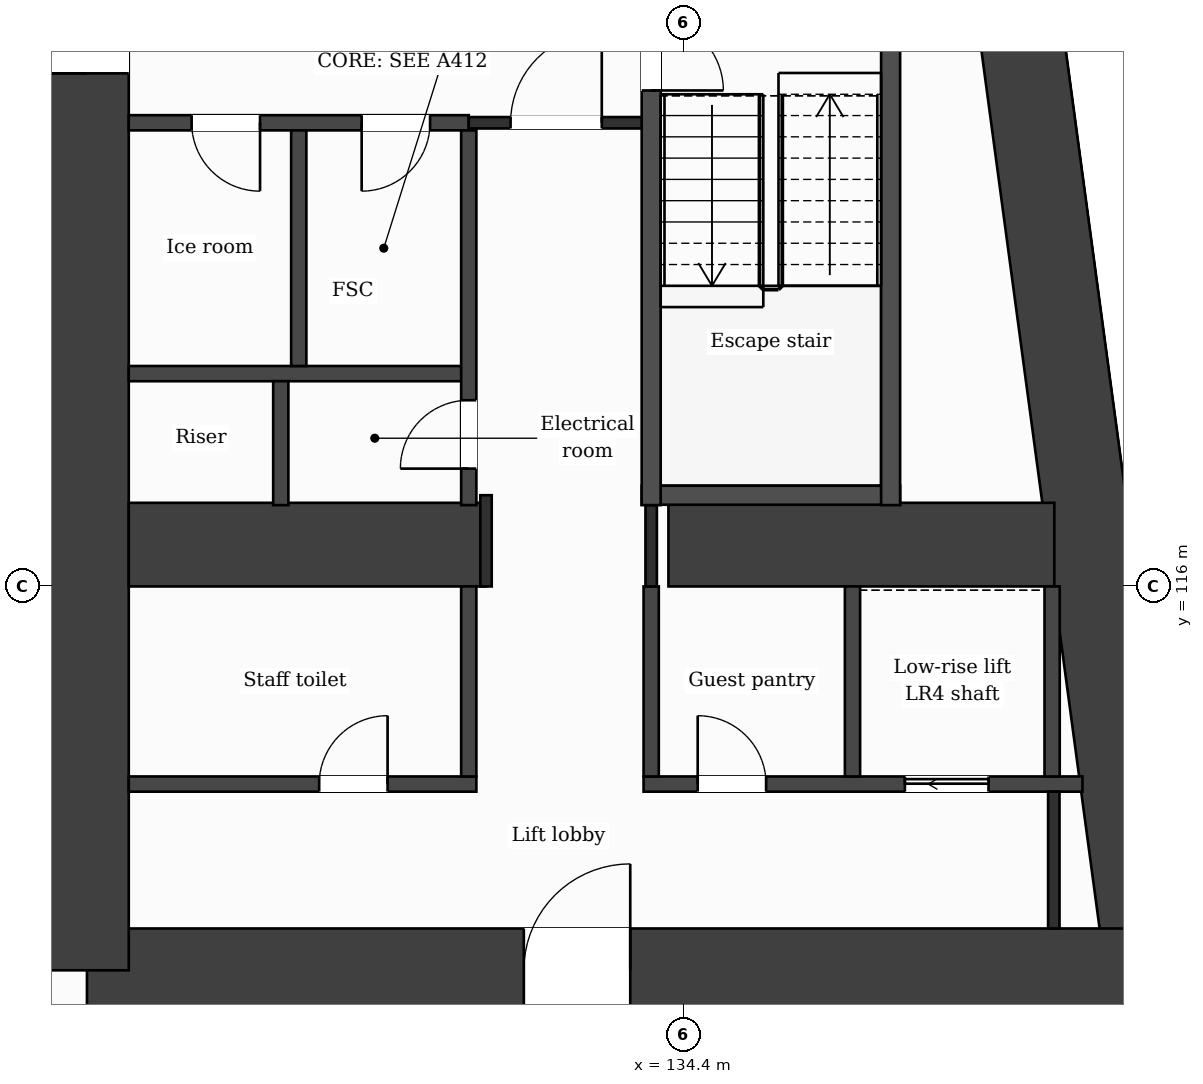
"""IFC4 building model, lengths in metres.
Left out: names, types, materials, properties, quantities, classifications, styles, units other than length and angle.
Written with IfcOpenShell. Run it as: python <this file> out.ifc"""

import sys

from ifc_helpers import new_model, si_unit, direction, frame, frame_2d, origin, place, context, subcontext, project, spatial, rectangle, extrude, element, fill, save


model = new_model("IFC4")
c1 = context("Model", 3, precision=1e-05, world=origin(), true_north=direction((0.0, 1.0)))
c2 = subcontext(c1, "Body", "Model", "MODEL_VIEW")
j1 = project(units=[si_unit("LENGTHUNIT", "METRE"), si_unit("PLANEANGLEUNIT", "RADIAN")], contexts=[c1])
p1 = place(None, origin())
s1 = spatial("IfcSite", under=j1, at=p1, CompositionType="ELEMENT")
p2 = place(p1, origin())
s2 = spatial("IfcBuilding", under=s1, at=p2, CompositionType="ELEMENT")
p3 = place(p2, frame((0.0, 0.0, 56.5)))
s3 = spatial("IfcBuildingStorey", under=s2, at=p3, CompositionType="ELEMENT", Elevation=56.5)
p4 = place(p3, frame((137.688, 131.85, 0.0), z_axis=(0.0, 0.0, 1.0), x_axis=(0.133411793472, -0.991060691059, 0.0)))
e1 = element("IfcWall", 1, at=p4, inside=s3, PredefinedType="SHEAR", context=c2, shape_type="SweptSolid", body=[
    extrude(rectangle(XDim=21.089, YDim=1.1, at=frame_2d((10.544, 0.0))), origin(), (0.0, 0.0, 1.0), 3.5),
])
p5 = place(p3, frame((140.502, 110.95, 0.0), z_axis=(0.0, 0.0, 1.0), x_axis=(-1.0, 0.0, 0.0)))
e2 = element("IfcWall", 2, at=p5, inside=s3, PredefinedType="SHEAR", context=c2, shape_type="SweptSolid", body=[
    extrude(rectangle(XDim=13.952, YDim=1.1, at=frame_2d((6.976, 0.0))), origin(), (0.0, 0.0, 1.0), 3.5),
])
p6 = place(p5, frame((6.804, 0.0, 0.0)))
e3 = element("IfcOpeningElement", 3, at=p6, cuts=e2, PredefinedType="OPENING", context=c2, shape_type="SweptSolid", body=[
    extrude(rectangle(XDim=1.4, YDim=2.1, at=frame_2d((0.7, 1.05))), frame((0.0, 0.56, 0.0), z_axis=(0.0, -1.0, 0.0), x_axis=(1.0, 0.0, 0.0)), (0.0, 0.0, 1.0), 1.12),
])
p7 = place(p3, frame((126.55, 110.95, 0.0), z_axis=(0.0, 0.0, 1.0), x_axis=(0.0, 1.0, 0.0)))
e4 = element("IfcWall", 4, at=p7, inside=s3, PredefinedType="SHEAR", context=c2, shape_type="SweptSolid", body=[
    extrude(rectangle(XDim=20.9, YDim=1.1, at=frame_2d((10.45, 0.0))), origin(), (0.0, 0.0, 1.0), 3.5),
])
p8 = place(p7, frame((11.8, 0.0, 0.0)))
e5 = element("IfcOpeningElement", 5, at=p8, cuts=e4, PredefinedType="OPENING", context=c2, shape_type="SweptSolid", body=[
    extrude(rectangle(XDim=1.4, YDim=2.1, at=frame_2d((0.7, 1.05))), frame((0.0, 0.56, 0.0), z_axis=(0.0, -1.0, 0.0), x_axis=(1.0, 0.0, 0.0)), (0.0, 0.0, 1.0), 1.12),
])
p9 = place(p3, frame((127.1, 116.55, 0.0), z_axis=(0.0, 0.0, 1.0), x_axis=(1.0, 0.0, 0.0)))
e6 = element("IfcWall", 6, at=p9, inside=s3, PredefinedType="SHEAR", context=c2, shape_type="SweptSolid", body=[
    extrude(rectangle(XDim=4.7, YDim=1.1, at=frame_2d((2.35, 0.0))), origin(), (0.0, 0.0, 1.0), 3.5),
])
p10 = place(p3, frame((134.2, 116.55, 0.0), z_axis=(0.0, 0.0, 1.0), x_axis=(1.0, 0.0, 0.0)))
e7 = element("IfcWall", 7, at=p10, inside=s3, PredefinedType="SHEAR", context=c2, shape_type="SweptSolid", body=[
    extrude(rectangle(XDim=5.077, YDim=1.1, at=frame_2d((2.539, 0.0))), origin(), (0.0, 0.0, 1.0), 3.5),
])
p11 = place(p3, frame((127.1, 113.4, 0.0), z_axis=(0.0, 0.0, 1.0), x_axis=(1.0, 0.0, 0.0)))
e8 = element("IfcWall", 8, at=p11, inside=s3, PredefinedType="PARTITIONING", context=c2, shape_type="SweptSolid", body=[
    extrude(rectangle(XDim=4.573, YDim=0.2, at=frame_2d((2.287, 0.0))), origin(), (0.0, 0.0, 1.0), 3.18),
])
p12 = place(p11, frame((2.505, 0.0, 0.0)))
e9 = element("IfcOpeningElement", 9, at=p12, cuts=e8, PredefinedType="OPENING", context=c2, shape_type="SweptSolid", body=[
    extrude(rectangle(XDim=0.9, YDim=2.1, at=frame_2d((0.45, 1.05))), frame((0.0, 0.11, 0.0), z_axis=(0.0, -1.0, 0.0), x_axis=(1.0, 0.0, 0.0)), (0.0, 0.0, 1.0), 0.22),
])
p13 = place(p3, frame((133.873, 113.4, 0.0), z_axis=(0.0, 0.0, 1.0), x_axis=(1.0, 0.0, 0.0)))
e10 = element("IfcWall", 10, at=p13, inside=s3, PredefinedType="PARTITIONING", context=c2, shape_type="SweptSolid", body=[
    extrude(rectangle(XDim=5.774, YDim=0.2, at=frame_2d((2.887, 0.0))), origin(), (0.0, 0.0, 1.0), 3.18),
])
p14 = place(p13, frame((3.438, 0.0, 0.0)))
e11 = element("IfcOpeningElement", 11, at=p14, cuts=e10, PredefinedType="OPENING", context=c2, shape_type="SweptSolid", body=[
    extrude(rectangle(XDim=1.1, YDim=2.1, at=frame_2d((0.55, 1.05))), frame((0.0, 0.11, 0.0), z_axis=(0.0, -1.0, 0.0), x_axis=(1.0, 0.0, 0.0)), (0.0, 0.0, 1.0), 0.22),
])
p15 = place(p13, frame((0.712, 0.0, 0.0)))
e12 = element("IfcOpeningElement", 12, at=p15, cuts=e10, PredefinedType="OPENING", context=c2, shape_type="SweptSolid", body=[
    extrude(rectangle(XDim=0.9, YDim=2.1, at=frame_2d((0.45, 1.05))), frame((0.0, 0.11, 0.0), z_axis=(0.0, -1.0, 0.0), x_axis=(1.0, 0.0, 0.0)), (0.0, 0.0, 1.0), 0.22),
])
p16 = place(p3, frame((133.848, 117.2, 0.0), z_axis=(0.0, 0.0, 1.0), x_axis=(1.0, 0.0, 0.0)))
e13 = element("IfcWall", 13, at=p16, inside=s3, PredefinedType="PARTITIONING", context=c2, shape_type="SweptSolid", body=[
    extrude(rectangle(XDim=3.4, YDim=0.25, at=frame_2d((1.7, 0.0))), origin(), (0.0, 0.0, 1.0), 3.18),
])
p17 = place(p3, frame((127.1, 118.8, 0.0), z_axis=(0.0, 0.0, 1.0), x_axis=(1.0, 0.0, 0.0)))
e14 = element("IfcWall", 14, at=p17, inside=s3, PredefinedType="PARTITIONING", context=c2, shape_type="SweptSolid", body=[
    extrude(rectangle(XDim=4.473, YDim=0.2, at=frame_2d((2.236, 0.0))), origin(), (0.0, 0.0, 1.0), 3.18),
])
p18 = place(p3, frame((127.1, 122.1, 0.0), z_axis=(0.0, 0.0, 1.0), x_axis=(1.0, 0.0, 0.0)))
e15 = element("IfcWall", 15, at=p18, inside=s3, PredefinedType="PARTITIONING", context=c2, shape_type="SweptSolid", body=[
    extrude(rectangle(XDim=4.473, YDim=0.2, at=frame_2d((2.236, 0.0))), origin(), (0.0, 0.0, 1.0), 3.18),
])
p19 = place(p18, frame((3.064, 0.0, 0.0)))
e16 = element("IfcOpeningElement", 16, at=p19, cuts=e15, PredefinedType="OPENING", context=c2, shape_type="SweptSolid", body=[
    extrude(rectangle(XDim=0.9, YDim=2.1, at=frame_2d((0.45, 1.05))), frame((0.0, 0.11, 0.0), z_axis=(0.0, -1.0, 0.0), x_axis=(1.0, 0.0, 0.0)), (0.0, 0.0, 1.0), 0.22),
])
p20 = place(p18, frame((0.827, 0.0, 0.0)))
e17 = element("IfcOpeningElement", 17, at=p20, cuts=e15, PredefinedType="OPENING", context=c2, shape_type="SweptSolid", body=[
    extrude(rectangle(XDim=0.9, YDim=2.1, at=frame_2d((0.45, 1.05))), frame((0.0, 0.11, 0.0), z_axis=(0.0, -1.0, 0.0), x_axis=(1.0, 0.0, 0.0)), (0.0, 0.0, 1.0), 0.22),
])
p21 = place(p3, frame((131.573, 122.1, 0.0), z_axis=(0.0, 0.0, 1.0), x_axis=(1.0, 0.0, 0.0)))
e18 = element("IfcWall", 18, at=p21, inside=s3, PredefinedType="PARTITIONING", context=c2, shape_type="SweptSolid", body=[
    extrude(rectangle(XDim=2.4, YDim=0.15, at=frame_2d((1.2, 0.0))), origin(), (0.0, 0.0, 1.0), 3.18),
])
p22 = place(p21, frame((0.55, 0.0, 0.0)))
e19 = element("IfcOpeningElement", 19, at=p22, cuts=e18, PredefinedType="OPENING", context=c2, shape_type="SweptSolid", body=[
    extrude(rectangle(XDim=1.2, YDim=2.1, at=frame_2d((0.6, 1.05))), frame((0.0, 0.085, 0.0), z_axis=(0.0, -1.0, 0.0), x_axis=(1.0, 0.0, 0.0)), (0.0, 0.0, 1.0), 0.17),
])
p23 = place(p3, frame((129.1, 117.07, 0.0), z_axis=(0.0, 0.0, 1.0), x_axis=(0.0, 1.0, 0.0)))
e20 = element("IfcWall", 20, at=p23, inside=s3, PredefinedType="PARTITIONING", context=c2, shape_type="SweptSolid", body=[
    extrude(rectangle(XDim=1.63, YDim=0.2, at=frame_2d((0.815, 0.0))), origin(), (0.0, 0.0, 1.0), 3.18),
])
p24 = place(p3, frame((129.336, 118.9, 0.0), z_axis=(0.0, 0.0, 1.0), x_axis=(0.0, 1.0, 0.0)))
e21 = element("IfcWall", 21, at=p24, inside=s3, PredefinedType="PARTITIONING", context=c2, shape_type="SweptSolid", body=[
    extrude(rectangle(XDim=3.1, YDim=0.2, at=frame_2d((1.55, 0.0))), origin(), (0.0, 0.0, 1.0), 3.18),
])
p25 = place(p3, frame((131.573, 113.5, 0.0), z_axis=(0.0, 0.0, 1.0), x_axis=(0.0, 1.0, 0.0)))
e22 = element("IfcWall", 22, at=p25, inside=s3, PredefinedType="PARTITIONING", context=c2, shape_type="SweptSolid", body=[
    extrude(rectangle(XDim=2.5, YDim=0.2, at=frame_2d((1.25, 0.0))), origin(), (0.0, 0.0, 1.0), 3.18),
])
p26 = place(p3, frame((131.573, 117.07, 0.0), z_axis=(0.0, 0.0, 1.0), x_axis=(0.0, 1.0, 0.0)))
e23 = element("IfcWall", 23, at=p26, inside=s3, PredefinedType="PARTITIONING", context=c2, shape_type="SweptSolid", body=[
    extrude(rectangle(XDim=4.93, YDim=0.2, at=frame_2d((2.465, 0.0))), origin(), (0.0, 0.0, 1.0), 3.18),
])
p27 = place(p26, frame((0.48, 0.0, 0.0)))
e24 = element("IfcOpeningElement", 24, at=p27, cuts=e23, PredefinedType="OPENING", context=c2, shape_type="SweptSolid", body=[
    extrude(rectangle(XDim=0.9, YDim=2.1, at=frame_2d((0.45, 1.05))), frame((0.0, 0.11, 0.0), z_axis=(0.0, -1.0, 0.0), x_axis=(1.0, 0.0, 0.0)), (0.0, 0.0, 1.0), 0.22),
])
p28 = place(p3, frame((131.8, 116.0, 0.0), z_axis=(0.0, 0.0, 1.0), x_axis=(0.0, 1.0, 0.0)))
e25 = element("IfcWall", 25, at=p28, inside=s3, PredefinedType="PARTITIONING", context=c2, shape_type="SweptSolid", body=[
    extrude(rectangle(XDim=1.2, YDim=0.15, at=frame_2d((0.6, 0.0))), origin(), (0.0, 0.0, 1.0), 3.18),
])
p29 = place(p3, frame((133.973, 113.5, 0.0), z_axis=(0.0, 0.0, 1.0), x_axis=(0.0, 1.0, 0.0)))
e26 = element("IfcWall", 26, at=p29, inside=s3, PredefinedType="PARTITIONING", context=c2, shape_type="SweptSolid", body=[
    extrude(rectangle(XDim=2.5, YDim=0.2, at=frame_2d((1.25, 0.0))), origin(), (0.0, 0.0, 1.0), 3.18),
])
p30 = place(p3, frame((133.973, 116.0, 0.0), z_axis=(0.0, 0.0, 1.0), x_axis=(0.0, 1.0, 0.0)))
e27 = element("IfcWall", 27, at=p30, inside=s3, PredefinedType="PARTITIONING", context=c2, shape_type="SweptSolid", body=[
    extrude(rectangle(XDim=1.07, YDim=0.15, at=frame_2d((0.535, 0.0))), origin(), (0.0, 0.0, 1.0), 3.18),
])
p31 = place(p3, frame((133.973, 117.07, 0.0), z_axis=(0.0, 0.0, 1.0), x_axis=(0.0, 1.0, 0.0)))
e28 = element("IfcWall", 28, at=p31, inside=s3, PredefinedType="PARTITIONING", context=c2, shape_type="SweptSolid", body=[
    extrude(rectangle(XDim=6.755, YDim=0.25, at=frame_2d((3.377, 0.0))), origin(), (0.0, 0.0, 1.0), 3.18),
])
p32 = place(p31, frame((5.455, 0.0, 0.0)))
e29 = element("IfcOpeningElement", 29, at=p32, cuts=e28, PredefinedType="OPENING", context=c2, shape_type="SweptSolid", body=[
    extrude(rectangle(XDim=0.95, YDim=2.1, at=frame_2d((0.475, 1.05))), frame((0.0, 0.135, 0.0), z_axis=(0.0, -1.0, 0.0), x_axis=(1.0, 0.0, 0.0)), (0.0, 0.0, 1.0), 0.27),
])
p33 = place(p3, frame((136.622, 113.5, 0.0), z_axis=(0.0, 0.0, 1.0), x_axis=(0.0, 1.0, 0.0)))
e30 = element("IfcWall", 30, at=p33, inside=s3, PredefinedType="PARTITIONING", context=c2, shape_type="SweptSolid", body=[
    extrude(rectangle(XDim=2.5, YDim=0.2, at=frame_2d((1.25, 0.0))), origin(), (0.0, 0.0, 1.0), 3.18),
])
p34 = place(p3, frame((137.123, 117.07, 0.0), z_axis=(0.0, 0.0, 1.0), x_axis=(0.0, 1.0, 0.0)))
e31 = element("IfcWall", 31, at=p34, inside=s3, PredefinedType="PARTITIONING", context=c2, shape_type="SweptSolid", body=[
    extrude(rectangle(XDim=6.755, YDim=0.25, at=frame_2d((3.377, 0.0))), origin(), (0.0, 0.0, 1.0), 3.18),
])
p35 = place(p3, frame((139.248, 113.5, 0.0), z_axis=(0.0, 0.0, 1.0), x_axis=(0.0, 1.0, 0.0)))
e32 = element("IfcWall", 32, at=p35, inside=s3, PredefinedType="PARTITIONING", context=c2, shape_type="SweptSolid", body=[
    extrude(rectangle(XDim=2.5, YDim=0.2, at=frame_2d((1.25, 0.0))), origin(), (0.0, 0.0, 1.0), 3.18),
])
p36 = place(p3, frame((139.27, 111.5, 0.0), z_axis=(0.0, 0.0, 1.0), x_axis=(0.0, 1.0, 0.0)))
e33 = element("IfcWall", 33, at=p36, inside=s3, PredefinedType="PARTITIONING", context=c2, shape_type="SweptSolid", body=[
    extrude(rectangle(XDim=1.8, YDim=0.15, at=frame_2d((0.9, 0.0))), origin(), (0.0, 0.0, 1.0), 3.18),
])
p37 = place(p22, origin())
e34 = element("IfcDoor", 34, at=p37, inside=s3, OperationType="SINGLE_SWING_RIGHT", PredefinedType="DOOR", context=c2, shape_type="SweptSolid", body=[
    extrude(rectangle(XDim=1.2, YDim=2.1, at=frame_2d((0.6, 1.05))), frame((0.0, 0.025, 0.0), z_axis=(0.0, -1.0, 0.0), x_axis=(1.0, 0.0, 0.0)), (0.0, 0.0, 1.0), 0.05),
])
fill(e19, e34)
p38 = place(p19, origin())
e35 = element("IfcDoor", 35, at=p38, inside=s3, OperationType="SINGLE_SWING_LEFT", PredefinedType="DOOR", context=c2, shape_type="SweptSolid", body=[
    extrude(rectangle(XDim=0.9, YDim=2.1, at=frame_2d((0.45, 1.05))), frame((0.0, 0.025, 0.0), z_axis=(0.0, -1.0, 0.0), x_axis=(1.0, 0.0, 0.0)), (0.0, 0.0, 1.0), 0.05),
])
fill(e16, e35)
p39 = place(p20, origin())
e36 = element("IfcDoor", 36, at=p39, inside=s3, OperationType="SINGLE_SWING_RIGHT", PredefinedType="DOOR", context=c2, shape_type="SweptSolid", body=[
    extrude(rectangle(XDim=0.9, YDim=2.1, at=frame_2d((0.45, 1.05))), frame((0.0, 0.025, 0.0), z_axis=(0.0, -1.0, 0.0), x_axis=(1.0, 0.0, 0.0)), (0.0, 0.0, 1.0), 0.05),
])
fill(e17, e36)
p40 = place(p32, origin())
e37 = element("IfcDoor", 37, at=p40, inside=s3, OperationType="SINGLE_SWING_LEFT", PredefinedType="DOOR", context=c2, shape_type="SweptSolid", body=[
    extrude(rectangle(XDim=0.95, YDim=2.1, at=frame_2d((0.475, 1.05))), frame((0.0, 0.025, 0.0), z_axis=(0.0, -1.0, 0.0), x_axis=(1.0, 0.0, 0.0)), (0.0, 0.0, 1.0), 0.05),
])
fill(e29, e37)
p41 = place(p27, origin())
e38 = element("IfcDoor", 38, at=p41, inside=s3, OperationType="SINGLE_SWING_LEFT", PredefinedType="DOOR", context=c2, shape_type="SweptSolid", body=[
    extrude(rectangle(XDim=0.9, YDim=2.1, at=frame_2d((0.45, 1.05))), frame((0.0, 0.025, 0.0), z_axis=(0.0, -1.0, 0.0), x_axis=(1.0, 0.0, 0.0)), (0.0, 0.0, 1.0), 0.05),
])
fill(e24, e38)
p42 = place(p14, origin())
e39 = element("IfcDoor", 39, at=p42, inside=s3, OperationType="SLIDING_TO_LEFT", PredefinedType="DOOR", context=c2, shape_type="SweptSolid", body=[
    extrude(rectangle(XDim=1.1, YDim=2.1, at=frame_2d((0.55, 1.05))), frame((0.0, 0.025, 0.0), z_axis=(0.0, -1.0, 0.0), x_axis=(1.0, 0.0, 0.0)), (0.0, 0.0, 1.0), 0.05),
])
fill(e11, e39)
p43 = place(p15, origin())
e40 = element("IfcDoor", 40, at=p43, inside=s3, OperationType="SINGLE_SWING_LEFT", PredefinedType="DOOR", context=c2, shape_type="SweptSolid", body=[
    extrude(rectangle(XDim=0.9, YDim=2.1, at=frame_2d((0.45, 1.05))), frame((0.0, 0.025, 0.0), z_axis=(0.0, -1.0, 0.0), x_axis=(1.0, 0.0, 0.0)), (0.0, 0.0, 1.0), 0.05),
])
fill(e12, e40)
p44 = place(p12, origin())
e41 = element("IfcDoor", 41, at=p44, inside=s3, OperationType="SINGLE_SWING_RIGHT", PredefinedType="DOOR", context=c2, shape_type="SweptSolid", body=[
    extrude(rectangle(XDim=0.9, YDim=2.1, at=frame_2d((0.45, 1.05))), frame((0.0, 0.025, 0.0), z_axis=(0.0, -1.0, 0.0), x_axis=(1.0, 0.0, 0.0)), (0.0, 0.0, 1.0), 0.05),
])
fill(e9, e41)
p45 = place(p6, origin())
e42 = element("IfcDoor", 42, at=p45, inside=s3, OperationType="SINGLE_SWING_LEFT", PredefinedType="DOOR", context=c2, shape_type="SweptSolid", body=[
    extrude(rectangle(XDim=1.4, YDim=2.1, at=frame_2d((0.7, 1.05))), frame((0.0, 0.025, 0.0), z_axis=(0.0, -1.0, 0.0), x_axis=(1.0, 0.0, 0.0)), (0.0, 0.0, 1.0), 0.05),
])
fill(e3, e42)
p46 = place(p8, origin())
e43 = element("IfcDoor", 43, at=p46, inside=s3, OperationType="SINGLE_SWING_LEFT", PredefinedType="DOOR", context=c2, shape_type="SweptSolid", body=[
    extrude(rectangle(XDim=1.4, YDim=2.1, at=frame_2d((0.7, 1.05))), frame((0.0, 0.025, 0.0), z_axis=(0.0, -1.0, 0.0), x_axis=(1.0, 0.0, 0.0)), (0.0, 0.0, 1.0), 0.05),
])
fill(e5, e43)
save(model, sys.argv[1])
